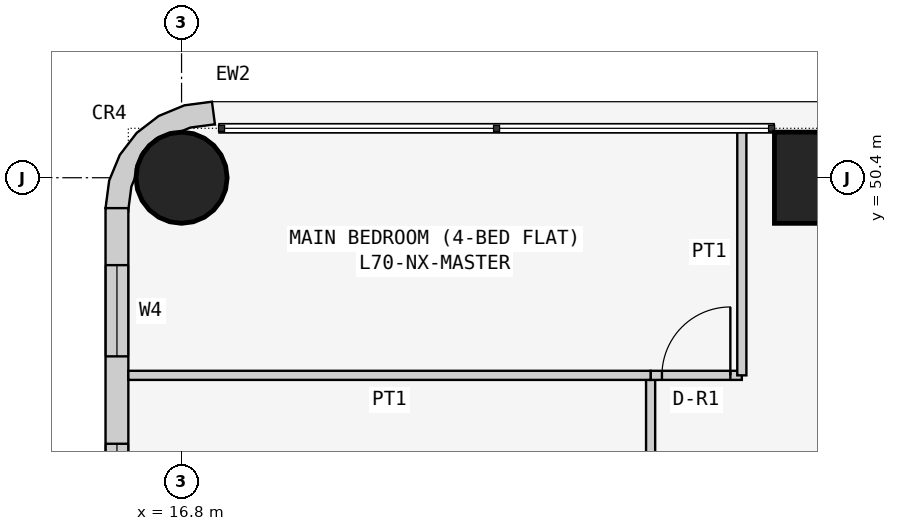
"""IFC4 building model, lengths in metres.
Left out: names, types, materials, properties, quantities, classifications, styles, units other than length and angle.
Written with IfcOpenShell. Run it as: python <this file> out.ifc"""

import sys

from ifc_helpers import new_model, si_unit, direction, frame, frame_2d, origin, origin_2d, place, context, subcontext, project, spatial, polyline, rectangle, circle, outline, extrude, element, fill, save


model = new_model("IFC4")
c1 = context("Model", 3, precision=1e-05, world=origin(), true_north=direction((0.0, 1.0)))
c2 = subcontext(c1, "Body", "Model", "MODEL_VIEW")
j1 = project(units=[si_unit("LENGTHUNIT", "METRE"), si_unit("PLANEANGLEUNIT", "RADIAN")], contexts=[c1])
p1 = place(None, origin())
s1 = spatial("IfcSite", under=j1, at=p1, CompositionType="ELEMENT")
p2 = place(p1, origin())
s2 = spatial("IfcBuilding", under=s1, at=p2, CompositionType="ELEMENT")
p3 = place(p2, frame((0.0, 0.0, 268.5)))
s3 = spatial("IfcBuildingStorey", under=s2, at=p3, CompositionType="ELEMENT", Elevation=268.5)
p4 = place(p3, frame((16.8, 50.4, 0.0), z_axis=(0.0, 0.0, 1.0), x_axis=(1.0, 0.0, 0.0)))
e1 = element("IfcColumn", 1, at=p4, inside=s3, PredefinedType="COLUMN", context=c2, shape_type="SweptSolid", body=[
    extrude(circle(Radius=0.6, at=origin_2d()), origin(), (0.0, 0.0, 1.0), 3.6),
])
p5 = place(p3, frame((25.2, 50.4, 0.0), z_axis=(0.0, 0.0, 1.0), x_axis=(1.0, 0.0, 0.0)))
e2 = element("IfcColumn", 2, at=p5, inside=s3, PredefinedType="COLUMN", context=c2, shape_type="SweptSolid", body=[
    extrude(rectangle(XDim=1.2, YDim=1.2, at=origin_2d()), origin(), (0.0, 0.0, 1.0), 3.6),
])
p6 = place(p3, frame((15.95, 50.0, 0.0), z_axis=(0.0, 0.0, 1.0), x_axis=(0.0, -1.0, 0.0)))
e3 = element("IfcWall", 3, at=p6, inside=s3, PredefinedType="SOLIDWALL", context=c2, shape_type="SweptSolid", body=[
    extrude(rectangle(XDim=7.3, YDim=0.3, at=frame_2d((3.65, 0.0))), origin(), (0.0, 0.0, 1.0), 3.45),
])
p7 = place(p6, frame((3.1, 0.0, 0.9)))
e4 = element("IfcOpeningElement", 4, at=p7, cuts=e3, PredefinedType="OPENING", context=c2, shape_type="SweptSolid", body=[
    extrude(rectangle(XDim=2.4, YDim=1.5, at=frame_2d((1.2, 0.75))), frame((0.0, 0.16, 0.0), z_axis=(0.0, -1.0, 0.0), x_axis=(1.0, 0.0, 0.0)), (0.0, 0.0, 1.0), 0.32),
])
p8 = place(p6, frame((0.75, 0.0, 0.9)))
e5 = element("IfcOpeningElement", 5, at=p8, cuts=e3, PredefinedType="OPENING", context=c2, shape_type="SweptSolid", body=[
    extrude(rectangle(XDim=1.2, YDim=1.5, at=frame_2d((0.6, 0.75))), frame((0.0, 0.16, 0.0), z_axis=(0.0, -1.0, 0.0), x_axis=(1.0, 0.0, 0.0)), (0.0, 0.0, 1.0), 0.32),
])
p9 = place(p3, frame((17.162, 50.976, 0.0), z_axis=(0.0, 0.0, 1.0), x_axis=(-0.707106781187, 0.707106781187, 0.0)))
e6 = element("IfcWall", 6, at=p9, inside=s3, PredefinedType="SOLIDWALL", context=c2, shape_type="SweptSolid", body=[
    extrude(outline(polyline([(0.047, -0.129), (0.033, -0.143), (0.273, -0.327), (0.495, -0.037), (0.635, 0.301), (0.683, 0.663), (0.635, 1.025), (0.495, 1.363), (0.273, 1.653), (0.033, 1.469), (0.047, 1.455), (0.233, 1.212), (0.292, 1.069), (0.358, 1.003), (0.449, 0.782), (0.449, 0.543), (0.358, 0.322), (0.292, 0.257), (0.233, 0.114), (0.047, -0.129)])), origin(), (0.0, 0.0, 1.0), 3.45),
])
p10 = place(p3, frame((22.971, 42.725, 0.0), z_axis=(0.0, 0.0, 1.0), x_axis=(0.0, 1.0, 0.0)))
e7 = element("IfcWall", 7, at=p10, inside=s3, PredefinedType="PARTITIONING", context=c2, shape_type="SweptSolid", body=[
    extrude(rectangle(XDim=5.075, YDim=0.12, at=frame_2d((2.538, 0.0))), origin(), (0.0, 0.0, 1.0), 3.45),
])
p11 = place(p10, frame((2.225, 0.0, 0.0)))
e8 = element("IfcOpeningElement", 8, at=p11, cuts=e7, PredefinedType="OPENING", context=c2, shape_type="SweptSolid", body=[
    extrude(rectangle(XDim=0.9, YDim=2.1, at=frame_2d((0.45, 1.05))), frame((0.0, 0.07, 0.0), z_axis=(0.0, -1.0, 0.0), x_axis=(1.0, 0.0, 0.0)), (0.0, 0.0, 1.0), 0.14),
])
p12 = place(p3, frame((22.971, 47.8, 0.0), z_axis=(0.0, 0.0, 1.0), x_axis=(1.0, 0.0, 0.0)))
e9 = element("IfcWall", 9, at=p12, inside=s3, PredefinedType="PARTITIONING", context=c2, shape_type="SweptSolid", body=[
    extrude(rectangle(XDim=1.2, YDim=0.12, at=frame_2d((0.6, 0.0))), origin(), (0.0, 0.0, 1.0), 3.45),
])
p13 = place(p12, frame((0.149, 0.0, 0.0)))
e10 = element("IfcOpeningElement", 10, at=p13, cuts=e9, PredefinedType="OPENING", context=c2, shape_type="SweptSolid", body=[
    extrude(rectangle(XDim=0.9, YDim=2.1, at=frame_2d((0.45, 1.05))), frame((0.0, 0.07, 0.0), z_axis=(0.0, -1.0, 0.0), x_axis=(1.0, 0.0, 0.0)), (0.0, 0.0, 1.0), 0.14),
])
p14 = place(p3, frame((24.171, 47.8, 0.0), z_axis=(0.0, 0.0, 1.0), x_axis=(0.0, 1.0, 0.0)))
e11 = element("IfcWall", 11, at=p14, inside=s3, PredefinedType="PARTITIONING", context=c2, shape_type="SweptSolid", body=[
    extrude(rectangle(XDim=3.25, YDim=0.12, at=frame_2d((1.625, 0.0))), origin(), (0.0, 0.0, 1.0), 3.45),
])
p15 = place(p3, frame((22.971, 47.8, 0.0), z_axis=(0.0, 0.0, 1.0), x_axis=(-1.0, 0.0, 0.0)))
e12 = element("IfcWall", 12, at=p15, inside=s3, PredefinedType="PARTITIONING", context=c2, shape_type="SweptSolid", body=[
    extrude(rectangle(XDim=6.871, YDim=0.12, at=frame_2d((3.436, 0.0))), origin(), (0.0, 0.0, 1.0), 3.45),
])
p16 = place(p7, origin())
e13 = element("IfcWindow", 13, at=p16, inside=s3, PartitioningType="SINGLE_PANEL", PredefinedType="WINDOW", context=c2, shape_type="SweptSolid", body=[
    extrude(rectangle(XDim=2.4, YDim=1.5, at=frame_2d((1.2, 0.75))), frame((0.0, 0.03, 0.0), z_axis=(0.0, -1.0, 0.0), x_axis=(1.0, 0.0, 0.0)), (0.0, 0.0, 1.0), 0.06),
])
fill(e4, e13)
p17 = place(p8, origin())
e14 = element("IfcWindow", 14, at=p17, inside=s3, PartitioningType="SINGLE_PANEL", PredefinedType="WINDOW", context=c2, shape_type="SweptSolid", body=[
    extrude(rectangle(XDim=1.2, YDim=1.5, at=frame_2d((0.6, 0.75))), frame((0.0, 0.03, 0.0), z_axis=(0.0, -1.0, 0.0), x_axis=(1.0, 0.0, 0.0)), (0.0, 0.0, 1.0), 0.06),
])
fill(e5, e14)
p18 = place(p13, origin())
e15 = element("IfcDoor", 15, at=p18, inside=s3, OperationType="SINGLE_SWING_RIGHT", PredefinedType="DOOR", context=c2, shape_type="SweptSolid", body=[
    extrude(rectangle(XDim=0.9, YDim=2.1, at=frame_2d((0.45, 1.05))), frame((0.0, 0.025, 0.0), z_axis=(0.0, -1.0, 0.0), x_axis=(1.0, 0.0, 0.0)), (0.0, 0.0, 1.0), 0.05),
])
fill(e10, e15)
save(model, sys.argv[1])
